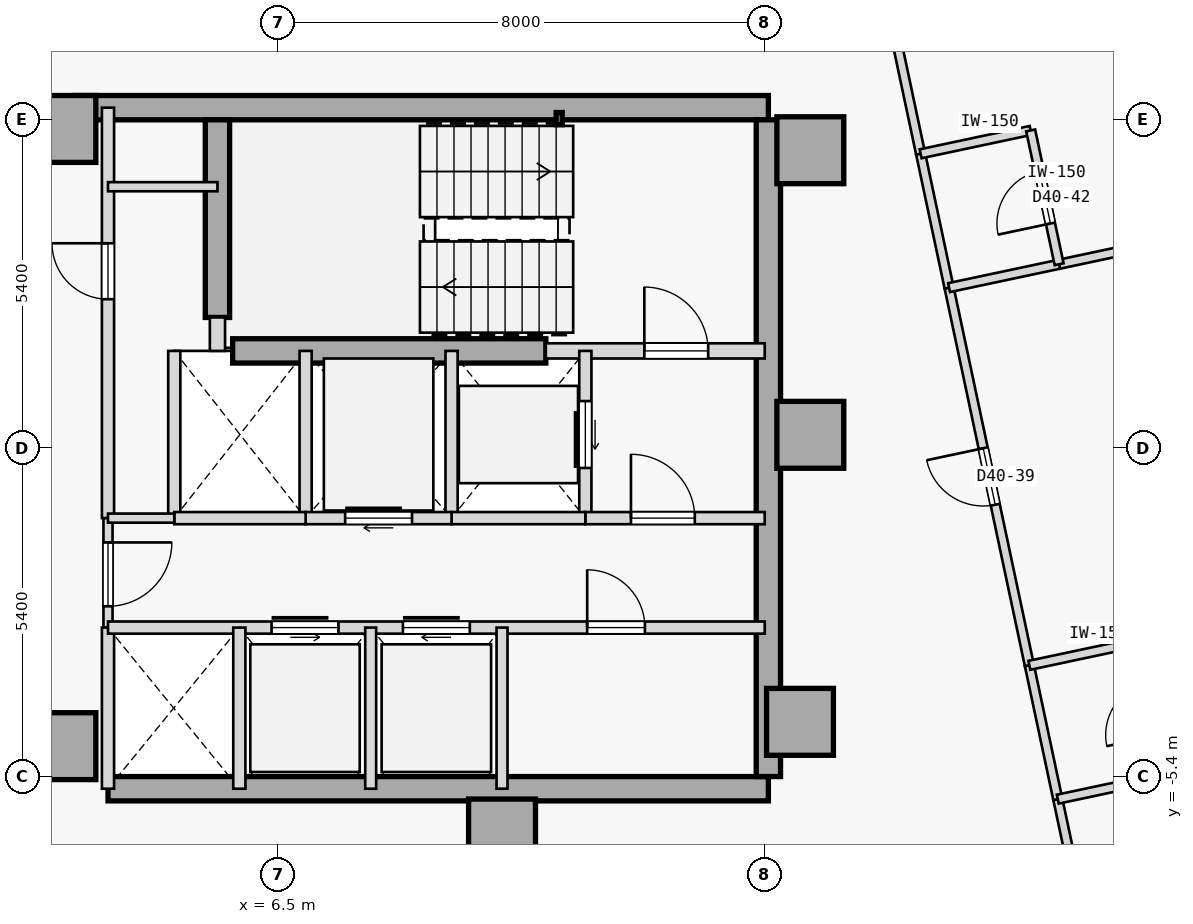
"""IFC4 building model, lengths in metres.
Left out: names, types, materials, properties, quantities, classifications, styles, units other than length and angle.
Written with IfcOpenShell. Run it as: python <this file> out.ifc"""

import sys

from ifc_helpers import new_model, si_unit, direction, frame, frame_2d, origin, origin_2d, place, context, subcontext, project, spatial, rectangle, hollow_rectangle, extrude, element, fill, save


model = new_model("IFC4")
c1 = context("Model", 3, precision=1e-05, world=origin(), true_north=direction((0.0, 1.0)))
c2 = subcontext(c1, "Body", "Model", "MODEL_VIEW")
j1 = project(units=[si_unit("LENGTHUNIT", "METRE"), si_unit("PLANEANGLEUNIT", "RADIAN")], contexts=[c1])
p1 = place(None, origin())
s1 = spatial("IfcSite", under=j1, at=p1, CompositionType="ELEMENT")
p2 = place(p1, origin())
s2 = spatial("IfcBuilding", under=s1, at=p2, CompositionType="ELEMENT")
p3 = place(p2, frame((0.0, 0.0, 158.2)))
s3 = spatial("IfcBuildingStorey", under=s2, at=p3, CompositionType="ELEMENT", Elevation=158.2)
for number, where, z_axis, x_axis in (
    (1, (15.25, 4.9, 0.0), (0.0, 0.0, 1.0), (1.0, 0.0, 0.0)),
    (2, (15.25, 0.22, 0.0), (0.0, 0.0, 1.0), (1.0, 0.0, 0.0)),
    (3, (15.08, -4.5, 0.0), (0.0, 0.0, 1.0), (1.0, 0.0, 0.0)),
    (4, (10.18, -6.32, 0.0), (0.0, 0.0, 1.0), (1.0, 0.0, 0.0)),
    (5, (2.95, -4.9, 0.0), (0.0, 0.0, 1.0), (1.0, 0.0, 0.0)),
    (6, (2.95, 5.25, 0.0), (0.0, 0.0, 1.0), (1.0, 0.0, 0.0)),
):
    element("IfcColumn", number, at=place(p3, frame(where, z_axis=z_axis, x_axis=x_axis)), inside=s3, PredefinedType="COLUMN", context=c2, shape_type="SweptSolid", body=[
        extrude(rectangle(XDim=1.1, YDim=1.1, at=origin_2d()), origin(), (0.0, 0.0, 1.0), 3.4),
    ])
p4 = place(p3, frame((3.15, 5.6, 0.0), z_axis=(0.0, 0.0, 1.0), x_axis=(1.0, 0.0, 0.0)))
e7 = element("IfcWall", 7, at=p4, inside=s3, PredefinedType="SHEAR", context=c2, shape_type="SweptSolid", body=[
    extrude(rectangle(XDim=11.41, YDim=0.4, at=frame_2d((5.705, 0.0))), origin(), (0.0, 0.0, 1.0), 3.175),
])
p5 = place(p3, frame((3.7, -5.6, 0.0), z_axis=(0.0, 0.0, 1.0), x_axis=(1.0, 0.0, 0.0)))
e8 = element("IfcWall", 8, at=p5, inside=s3, PredefinedType="SHEAR", context=c2, shape_type="SweptSolid", body=[
    extrude(rectangle(XDim=10.86, YDim=0.4, at=frame_2d((5.43, 0.0))), origin(), (0.0, 0.0, 1.0), 3.175),
])
p6 = place(p3, frame((14.56, -5.4, 0.0), z_axis=(0.0, 0.0, 1.0), x_axis=(0.0, 1.0, 0.0)))
e9 = element("IfcWall", 9, at=p6, inside=s3, PredefinedType="SHEAR", context=c2, shape_type="SweptSolid", body=[
    extrude(rectangle(XDim=10.8, YDim=0.4, at=frame_2d((5.4, 0.0))), origin(), (0.0, 0.0, 1.0), 3.175),
])
p7 = place(p3, frame((5.5, 2.15, 0.0), z_axis=(0.0, 0.0, 1.0), x_axis=(0.0, 1.0, 0.0)))
e10 = element("IfcWall", 10, at=p7, inside=s3, PredefinedType="SHEAR", context=c2, shape_type="SweptSolid", body=[
    extrude(rectangle(XDim=3.25, YDim=0.4, at=frame_2d((1.625, 0.0))), origin(), (0.0, 0.0, 1.0), 3.175),
])
p8 = place(p3, frame((5.75, 1.6, 0.0), z_axis=(0.0, 0.0, 1.0), x_axis=(1.0, 0.0, 0.0)))
e11 = element("IfcWall", 11, at=p8, inside=s3, PredefinedType="SHEAR", context=c2, shape_type="SweptSolid", body=[
    extrude(rectangle(XDim=5.15, YDim=0.4, at=frame_2d((2.575, 0.0))), origin(), (0.0, 0.0, 1.0), 3.175),
])
p9 = place(p3, frame((11.12, 5.42, 0.0), z_axis=(0.0, 0.0, 1.0), x_axis=(1.0, 0.0, 0.0)))
e12 = element("IfcColumn", 12, at=p9, inside=s3, PredefinedType="COLUMN", context=c2, shape_type="SweptSolid", body=[
    extrude(hollow_rectangle(XDim=0.1, YDim=0.2, WallThickness=0.008, at=origin_2d()), origin(), (0.0, 0.0, 1.0), 3.4),
])
p10 = place(p3, frame((10.9, 1.6, 0.0), z_axis=(0.0, 0.0, 1.0), x_axis=(1.0, 0.0, 0.0)))
e13 = element("IfcWall", 13, at=p10, inside=s3, PredefinedType="STANDARD", context=c2, shape_type="SweptSolid", body=[
    extrude(rectangle(XDim=3.6, YDim=0.25, at=frame_2d((1.8, 0.0))), origin(), (0.0, 0.0, 1.0), 3.175),
])
p11 = place(p10, frame((1.62, 0.0, 0.0)))
e14 = element("IfcOpeningElement", 14, at=p11, cuts=e13, PredefinedType="OPENING", context=c2, shape_type="SweptSolid", body=[
    extrude(rectangle(XDim=1.05, YDim=2.15, at=frame_2d((0.525, 1.075))), frame((0.0, 0.135, 0.0), z_axis=(0.0, -1.0, 0.0), x_axis=(1.0, 0.0, 0.0)), (0.0, 0.0, 1.0), 0.27),
])
p12 = place(p3, frame((5.5, 1.6, 0.0), z_axis=(0.0, 0.0, 1.0), x_axis=(0.0, 1.0, 0.0)))
e15 = element("IfcWall", 15, at=p12, inside=s3, PredefinedType="STANDARD", context=c2, shape_type="SweptSolid", body=[
    extrude(rectangle(XDim=0.55, YDim=0.25, at=frame_2d((0.275, 0.0))), origin(), (0.0, 0.0, 1.0), 3.175),
])
p13 = place(p3, frame((3.7, -1.15, 0.0), z_axis=(0.0, 0.0, 1.0), x_axis=(0.0, 1.0, 0.0)))
e16 = element("IfcWall", 16, at=p13, inside=s3, PredefinedType="STANDARD", context=c2, shape_type="SweptSolid", body=[
    extrude(rectangle(XDim=6.75, YDim=0.2, at=frame_2d((3.375, 0.0))), origin(), (0.0, 0.0, 1.0), 3.175),
])
p14 = place(p13, frame((3.6, 0.0, 0.0)))
e17 = element("IfcOpeningElement", 17, at=p14, cuts=e16, PredefinedType="OPENING", context=c2, shape_type="SweptSolid", body=[
    extrude(rectangle(XDim=0.92, YDim=2.15, at=frame_2d((0.46, 1.075))), frame((0.0, 0.11, 0.0), z_axis=(0.0, -1.0, 0.0), x_axis=(1.0, 0.0, 0.0)), (0.0, 0.0, 1.0), 0.22),
])
p15 = place(p3, frame((3.7, -2.95, 0.0), z_axis=(0.0, 0.0, 1.0), x_axis=(0.0, 1.0, 0.0)))
e18 = element("IfcWall", 18, at=p15, inside=s3, PredefinedType="PARTITIONING", context=c2, shape_type="SweptSolid", body=[
    extrude(rectangle(XDim=1.8, YDim=0.15, at=frame_2d((0.9, 0.0))), origin(), (0.0, 0.0, 1.0), 3.175),
])
p16 = place(p15, frame((0.35, 0.0, 0.0)))
e19 = element("IfcOpeningElement", 19, at=p16, cuts=e18, PredefinedType="OPENING", context=c2, shape_type="SweptSolid", body=[
    extrude(rectangle(XDim=1.05, YDim=2.18, at=frame_2d((0.525, 1.09))), frame((0.0, 0.085, 0.0), z_axis=(0.0, -1.0, 0.0), x_axis=(1.0, 0.0, 0.0)), (0.0, 0.0, 1.0), 0.17),
])
p17 = place(p3, frame((3.7, -5.6, 0.0), z_axis=(0.0, 0.0, 1.0), x_axis=(0.0, 1.0, 0.0)))
e20 = element("IfcWall", 20, at=p17, inside=s3, PredefinedType="STANDARD", context=c2, shape_type="SweptSolid", body=[
    extrude(rectangle(XDim=2.65, YDim=0.2, at=frame_2d((1.325, 0.0))), origin(), (0.0, 0.0, 1.0), 3.175),
])
p18 = place(p3, frame((11.55, -1.15, 0.0), z_axis=(0.0, 0.0, 1.0), x_axis=(0.0, 1.0, 0.0)))
e21 = element("IfcWall", 21, at=p18, inside=s3, PredefinedType="STANDARD", context=c2, shape_type="SweptSolid", body=[
    extrude(rectangle(XDim=2.75, YDim=0.2, at=frame_2d((1.375, 0.0))), origin(), (0.0, 0.0, 1.0), 3.175),
])
p19 = place(p18, frame((0.825, 0.0, 0.0)))
e22 = element("IfcOpeningElement", 22, at=p19, cuts=e21, PredefinedType="OPENING", context=c2, shape_type="SweptSolid", body=[
    extrude(rectangle(XDim=1.1, YDim=2.15, at=frame_2d((0.55, 1.075))), frame((0.0, 0.11, 0.0), z_axis=(0.0, -1.0, 0.0), x_axis=(1.0, 0.0, 0.0)), (0.0, 0.0, 1.0), 0.22),
])
p20 = place(p3, frame((9.35, -1.15, 0.0), z_axis=(0.0, 0.0, 1.0), x_axis=(0.0, 1.0, 0.0)))
e23 = element("IfcWall", 23, at=p20, inside=s3, PredefinedType="STANDARD", context=c2, shape_type="SweptSolid", body=[
    extrude(rectangle(XDim=2.75, YDim=0.2, at=frame_2d((1.375, 0.0))), origin(), (0.0, 0.0, 1.0), 3.175),
])
p21 = place(p3, frame((11.55, -1.15, 0.0), z_axis=(0.0, 0.0, 1.0), x_axis=(1.0, 0.0, 0.0)))
e24 = element("IfcWall", 24, at=p21, inside=s3, PredefinedType="STANDARD", context=c2, shape_type="SweptSolid", body=[
    extrude(rectangle(XDim=2.95, YDim=0.2, at=frame_2d((1.475, 0.0))), origin(), (0.0, 0.0, 1.0), 3.175),
])
p22 = place(p21, frame((0.75, 0.0, 0.0)))
e25 = element("IfcOpeningElement", 25, at=p22, cuts=e24, PredefinedType="OPENING", context=c2, shape_type="SweptSolid", body=[
    extrude(rectangle(XDim=1.05, YDim=2.18, at=frame_2d((0.525, 1.09))), frame((0.0, 0.11, 0.0), z_axis=(0.0, -1.0, 0.0), x_axis=(1.0, 0.0, 0.0)), (0.0, 0.0, 1.0), 0.22),
])
p23 = place(p3, frame((9.35, -1.15, 0.0), z_axis=(0.0, 0.0, 1.0), x_axis=(1.0, 0.0, 0.0)))
e26 = element("IfcWall", 26, at=p23, inside=s3, PredefinedType="STANDARD", context=c2, shape_type="SweptSolid", body=[
    extrude(rectangle(XDim=2.2, YDim=0.2, at=frame_2d((1.1, 0.0))), origin(), (0.0, 0.0, 1.0), 3.175),
])
p24 = place(p3, frame((6.95, -1.15, 0.0), z_axis=(0.0, 0.0, 1.0), x_axis=(0.0, 1.0, 0.0)))
e27 = element("IfcWall", 27, at=p24, inside=s3, PredefinedType="STANDARD", context=c2, shape_type="SweptSolid", body=[
    extrude(rectangle(XDim=2.75, YDim=0.2, at=frame_2d((1.375, 0.0))), origin(), (0.0, 0.0, 1.0), 3.175),
])
p25 = place(p3, frame((6.95, -1.15, 0.0), z_axis=(0.0, 0.0, 1.0), x_axis=(1.0, 0.0, 0.0)))
e28 = element("IfcWall", 28, at=p25, inside=s3, PredefinedType="STANDARD", context=c2, shape_type="SweptSolid", body=[
    extrude(rectangle(XDim=2.4, YDim=0.2, at=frame_2d((1.2, 0.0))), origin(), (0.0, 0.0, 1.0), 3.175),
])
p26 = place(p25, frame((0.65, 0.0, 0.0)))
e29 = element("IfcOpeningElement", 29, at=p26, cuts=e28, PredefinedType="OPENING", context=c2, shape_type="SweptSolid", body=[
    extrude(rectangle(XDim=1.1, YDim=2.15, at=frame_2d((0.55, 1.075))), frame((0.0, 0.11, 0.0), z_axis=(0.0, -1.0, 0.0), x_axis=(1.0, 0.0, 0.0)), (0.0, 0.0, 1.0), 0.22),
])
p27 = place(p3, frame((4.79, -1.15, 0.0), z_axis=(0.0, 0.0, 1.0), x_axis=(0.0, 1.0, 0.0)))
e30 = element("IfcWall", 30, at=p27, inside=s3, PredefinedType="STANDARD", context=c2, shape_type="SweptSolid", body=[
    extrude(rectangle(XDim=2.75, YDim=0.2, at=frame_2d((1.375, 0.0))), origin(), (0.0, 0.0, 1.0), 3.175),
])
p28 = place(p3, frame((4.79, -1.15, 0.0), z_axis=(0.0, 0.0, 1.0), x_axis=(1.0, 0.0, 0.0)))
e31 = element("IfcWall", 31, at=p28, inside=s3, PredefinedType="STANDARD", context=c2, shape_type="SweptSolid", body=[
    extrude(rectangle(XDim=2.16, YDim=0.2, at=frame_2d((1.08, 0.0))), origin(), (0.0, 0.0, 1.0), 3.175),
])
p29 = place(p3, frame((3.7, -1.15, 0.0), z_axis=(0.0, 0.0, 1.0), x_axis=(1.0, 0.0, 0.0)))
e32 = element("IfcWall", 32, at=p29, inside=s3, PredefinedType="PARTITIONING", context=c2, shape_type="SweptSolid", body=[
    extrude(rectangle(XDim=1.09, YDim=0.15, at=frame_2d((0.545, 0.0))), origin(), (0.0, 0.0, 1.0), 3.175),
])
p30 = place(p3, frame((3.7, -2.95, 0.0), z_axis=(0.0, 0.0, 1.0), x_axis=(1.0, 0.0, 0.0)))
e33 = element("IfcWall", 33, at=p30, inside=s3, PredefinedType="STANDARD", context=c2, shape_type="SweptSolid", body=[
    extrude(rectangle(XDim=10.8, YDim=0.2, at=frame_2d((5.4, 0.0))), origin(), (0.0, 0.0, 1.0), 3.175),
])
p31 = place(p30, frame((2.69, 0.0, 0.0)))
e34 = element("IfcOpeningElement", 34, at=p31, cuts=e33, PredefinedType="OPENING", context=c2, shape_type="SweptSolid", body=[
    extrude(rectangle(XDim=1.1, YDim=2.15, at=frame_2d((0.55, 1.075))), frame((0.0, 0.11, 0.0), z_axis=(0.0, -1.0, 0.0), x_axis=(1.0, 0.0, 0.0)), (0.0, 0.0, 1.0), 0.22),
])
p32 = place(p30, frame((4.85, 0.0, 0.0)))
e35 = element("IfcOpeningElement", 35, at=p32, cuts=e33, PredefinedType="OPENING", context=c2, shape_type="SweptSolid", body=[
    extrude(rectangle(XDim=1.1, YDim=2.15, at=frame_2d((0.55, 1.075))), frame((0.0, 0.11, 0.0), z_axis=(0.0, -1.0, 0.0), x_axis=(1.0, 0.0, 0.0)), (0.0, 0.0, 1.0), 0.22),
])
p33 = place(p30, frame((7.88, 0.0, 0.0)))
e36 = element("IfcOpeningElement", 36, at=p33, cuts=e33, PredefinedType="OPENING", context=c2, shape_type="SweptSolid", body=[
    extrude(rectangle(XDim=0.95, YDim=2.15, at=frame_2d((0.475, 1.075))), frame((0.0, 0.11, 0.0), z_axis=(0.0, -1.0, 0.0), x_axis=(1.0, 0.0, 0.0)), (0.0, 0.0, 1.0), 0.22),
])
p34 = place(p3, frame((5.86, -5.6, 0.0), z_axis=(0.0, 0.0, 1.0), x_axis=(0.0, 1.0, 0.0)))
e37 = element("IfcWall", 37, at=p34, inside=s3, PredefinedType="STANDARD", context=c2, shape_type="SweptSolid", body=[
    extrude(rectangle(XDim=2.65, YDim=0.2, at=frame_2d((1.325, 0.0))), origin(), (0.0, 0.0, 1.0), 3.175),
])
for number, where, z_axis, x_axis in (
    (38, (10.18, -5.6, 0.0), (0.0, 0.0, 1.0), (0.0, 1.0, 0.0)),
    (39, (8.02, -5.6, 0.0), (0.0, 0.0, 1.0), (0.0, 1.0, 0.0)),
):
    element("IfcWall", number, at=place(p3, frame(where, z_axis=z_axis, x_axis=x_axis)), inside=s3, PredefinedType="STANDARD", context=c2, shape_type="SweptSolid", body=[
        extrude(rectangle(XDim=2.65, YDim=0.18, at=frame_2d((1.325, 0.0))), origin(), (0.0, 0.0, 1.0), 3.175),
    ])
p35 = place(p3, frame((3.7, 4.3, 0.0), z_axis=(0.0, 0.0, 1.0), x_axis=(1.0, 0.0, 0.0)))
e40 = element("IfcWall", 40, at=p35, inside=s3, PredefinedType="PARTITIONING", context=c2, shape_type="SweptSolid", body=[
    extrude(rectangle(XDim=1.8, YDim=0.15, at=frame_2d((0.9, 0.0))), origin(), (0.0, 0.0, 1.0), 3.175),
])
p36 = place(p3, frame((20.328, -10.515, 0.0), z_axis=(0.0, 0.0, 1.0), x_axis=(-0.207950868925, 0.97813927235, 0.0)))
e41 = element("IfcWall", 41, at=p36, inside=s3, PredefinedType="PARTITIONING", context=c2, shape_type="SweptSolid", body=[
    extrude(rectangle(XDim=4.85, YDim=0.15, at=frame_2d((2.425, 0.0))), origin(), (0.0, 0.0, 1.0), 3.175),
])
p37 = place(p36, frame((1.95, 0.0, 0.0)))
e42 = element("IfcOpeningElement", 42, at=p37, cuts=e41, PredefinedType="OPENING", context=c2, shape_type="SweptSolid", body=[
    extrude(rectangle(XDim=0.95, YDim=2.15, at=frame_2d((0.475, 1.075))), frame((0.0, 0.085, 0.0), z_axis=(0.0, -1.0, 0.0), x_axis=(1.0, 0.0, 0.0)), (0.0, 0.0, 1.0), 0.17),
])
p38 = place(p3, frame((18.852, -3.571, 0.0), z_axis=(0.0, 0.0, 1.0), x_axis=(-0.207879907349, 0.978154355979, 0.0)))
e43 = element("IfcWall", 43, at=p38, inside=s3, PredefinedType="PARTITIONING", context=c2, shape_type="SweptSolid", body=[
    extrude(rectangle(XDim=6.35, YDim=0.15, at=frame_2d((3.175, 0.0))), origin(), (0.0, 0.0, 1.0), 3.175),
])
p39 = place(p38, frame((2.7, 0.0, 0.0)))
e44 = element("IfcOpeningElement", 44, at=p39, cuts=e43, PredefinedType="OPENING", context=c2, shape_type="SweptSolid", body=[
    extrude(rectangle(XDim=0.95, YDim=2.15, at=frame_2d((0.475, 1.075))), frame((0.0, 0.085, 0.0), z_axis=(0.0, -1.0, 0.0), x_axis=(1.0, 0.0, 0.0)), (0.0, 0.0, 1.0), 0.17),
])
p40 = place(p3, frame((19.32, -5.771, 0.0), z_axis=(0.0, 0.0, 1.0), x_axis=(-0.207913264065, 0.978147266328, 0.0)))
e45 = element("IfcWall", 45, at=p40, inside=s3, PredefinedType="PARTITIONING", context=c2, shape_type="SweptSolid", body=[
    extrude(rectangle(XDim=2.25, YDim=0.15, at=frame_2d((1.125, 0.0))), origin(), (0.0, 0.0, 1.0), 3.175),
])
p41 = place(p3, frame((17.064, 4.841, 0.0), z_axis=(0.0, 0.0, 1.0), x_axis=(-0.207924511115, 0.978144875608, 0.0)))
e46 = element("IfcWall", 46, at=p41, inside=s3, PredefinedType="PARTITIONING", context=c2, shape_type="SweptSolid", body=[
    extrude(rectangle(XDim=6.35, YDim=0.15, at=frame_2d((3.175, 0.0))), origin(), (0.0, 0.0, 1.0), 3.175),
])
p42 = place(p41, frame((2.7, 0.0, 0.0)))
e47 = element("IfcOpeningElement", 47, at=p42, cuts=e46, PredefinedType="OPENING", context=c2, shape_type="SweptSolid", body=[
    extrude(rectangle(XDim=0.95, YDim=2.15, at=frame_2d((0.475, 1.075))), frame((0.0, 0.085, 0.0), z_axis=(0.0, -1.0, 0.0), x_axis=(1.0, 0.0, 0.0)), (0.0, 0.0, 1.0), 0.17),
])
p43 = place(p3, frame((17.532, 2.641, 0.0), z_axis=(0.0, 0.0, 1.0), x_axis=(-0.207913264065, 0.978147266328, 0.0)))
e48 = element("IfcWall", 48, at=p43, inside=s3, PredefinedType="PARTITIONING", context=c2, shape_type="SweptSolid", body=[
    extrude(rectangle(XDim=2.25, YDim=0.15, at=frame_2d((1.125, 0.0))), origin(), (0.0, 0.0, 1.0), 3.175),
])
p44 = place(p3, frame((19.32, -5.771, 0.0), z_axis=(0.0, 0.0, 1.0), x_axis=(0.978165892835, 0.207825614625, 0.0)))
e49 = element("IfcWall", 49, at=p44, inside=s3, PredefinedType="PARTITIONING", context=c2, shape_type="SweptSolid", body=[
    extrude(rectangle(XDim=1.85, YDim=0.15, at=frame_2d((0.925, 0.0))), origin(), (0.0, 0.0, 1.0), 3.175),
])
p45 = place(p3, frame((18.852, -3.571, 0.0), z_axis=(0.0, 0.0, 1.0), x_axis=(0.978139061018, 0.207951862966, 0.0)))
e50 = element("IfcWall", 50, at=p45, inside=s3, PredefinedType="PARTITIONING", context=c2, shape_type="SweptSolid", body=[
    extrude(rectangle(XDim=1.85, YDim=0.15, at=frame_2d((0.925, 0.0))), origin(), (0.0, 0.0, 1.0), 3.175),
])
p46 = place(p3, frame((19.341, 3.025, 0.0), z_axis=(0.0, 0.0, 1.0), x_axis=(0.97814556055, 0.207921288896, 0.0)))
e51 = element("IfcWall", 51, at=p46, inside=s3, PredefinedType="PARTITIONING", context=c2, shape_type="SweptSolid", body=[
    extrude(rectangle(XDim=12.187, YDim=0.15, at=frame_2d((6.094, 0.0))), origin(), (0.0, 0.0, 1.0), 3.175),
])
p47 = place(p3, frame((17.532, 2.641, 0.0), z_axis=(0.0, 0.0, 1.0), x_axis=(0.978160192495, 0.207852442415, 0.0)))
e52 = element("IfcWall", 52, at=p47, inside=s3, PredefinedType="PARTITIONING", context=c2, shape_type="SweptSolid", body=[
    extrude(rectangle(XDim=1.85, YDim=0.15, at=frame_2d((0.925, 0.0))), origin(), (0.0, 0.0, 1.0), 3.175),
])
p48 = place(p3, frame((17.064, 4.841, 0.0), z_axis=(0.0, 0.0, 1.0), x_axis=(0.978133353907, 0.20797870558, 0.0)))
e53 = element("IfcWall", 53, at=p48, inside=s3, PredefinedType="PARTITIONING", context=c2, shape_type="SweptSolid", body=[
    extrude(rectangle(XDim=1.85, YDim=0.15, at=frame_2d((0.925, 0.0))), origin(), (0.0, 0.0, 1.0), 3.175),
])
p49 = place(p3, frame((19.341, 3.025, 0.0), z_axis=(0.0, 0.0, 1.0), x_axis=(-0.207891197838, 0.978151956427, 0.0)))
e54 = element("IfcWall", 54, at=p49, inside=s3, PredefinedType="PARTITIONING", context=c2, shape_type="SweptSolid", body=[
    extrude(rectangle(XDim=2.25, YDim=0.15, at=frame_2d((1.125, 0.0))), origin(), (0.0, 0.0, 1.0), 3.175),
])
p50 = place(p49, frame((0.685, 0.0, 0.0)))
e55 = element("IfcOpeningElement", 55, at=p50, cuts=e54, PredefinedType="OPENING", context=c2, shape_type="SweptSolid", body=[
    extrude(rectangle(XDim=0.88, YDim=2.15, at=frame_2d((0.44, 1.075))), frame((0.0, 0.085, 0.0), z_axis=(0.0, -1.0, 0.0), x_axis=(1.0, 0.0, 0.0)), (0.0, 0.0, 1.0), 0.17),
])
p51 = place(p11, origin())
e56 = element("IfcDoor", 56, at=p51, inside=s3, OperationType="SINGLE_SWING_LEFT", PredefinedType="DOOR", context=c2, shape_type="SweptSolid", body=[
    extrude(rectangle(XDim=1.05, YDim=2.15, at=frame_2d((0.525, 1.075))), frame((0.0, 0.025, 0.0), z_axis=(0.0, -1.0, 0.0), x_axis=(1.0, 0.0, 0.0)), (0.0, 0.0, 1.0), 0.05),
])
fill(e14, e56)
p52 = place(p22, origin())
e57 = element("IfcDoor", 57, at=p52, inside=s3, OperationType="SINGLE_SWING_LEFT", PredefinedType="DOOR", context=c2, shape_type="SweptSolid", body=[
    extrude(rectangle(XDim=1.05, YDim=2.18, at=frame_2d((0.525, 1.09))), frame((0.0, 0.025, 0.0), z_axis=(0.0, -1.0, 0.0), x_axis=(1.0, 0.0, 0.0)), (0.0, 0.0, 1.0), 0.05),
])
fill(e25, e57)
p53 = place(p16, frame((1.05, 0.0, 0.0), z_axis=(0.0, 0.0, 1.0), x_axis=(-1.0, 0.0, 0.0)))
e58 = element("IfcDoor", 58, at=p53, inside=s3, OperationType="SINGLE_SWING_RIGHT", PredefinedType="DOOR", context=c2, shape_type="SweptSolid", body=[
    extrude(rectangle(XDim=1.05, YDim=2.18, at=frame_2d((0.525, 1.09))), frame((0.0, 0.025, 0.0), z_axis=(0.0, -1.0, 0.0), x_axis=(1.0, 0.0, 0.0)), (0.0, 0.0, 1.0), 0.05),
])
fill(e19, e58)
p54 = place(p19, origin())
e59 = element("IfcDoor", 59, at=p54, inside=s3, OperationType="SLIDING_TO_RIGHT", PredefinedType="DOOR", context=c2, shape_type="SweptSolid", body=[
    extrude(rectangle(XDim=1.1, YDim=2.15, at=frame_2d((0.55, 1.075))), frame((0.0, 0.025, 0.0), z_axis=(0.0, -1.0, 0.0), x_axis=(1.0, 0.0, 0.0)), (0.0, 0.0, 1.0), 0.05),
])
fill(e22, e59)
p55 = place(p26, origin())
e60 = element("IfcDoor", 60, at=p55, inside=s3, OperationType="SLIDING_TO_RIGHT", PredefinedType="DOOR", context=c2, shape_type="SweptSolid", body=[
    extrude(rectangle(XDim=1.1, YDim=2.15, at=frame_2d((0.55, 1.075))), frame((0.0, 0.025, 0.0), z_axis=(0.0, -1.0, 0.0), x_axis=(1.0, 0.0, 0.0)), (0.0, 0.0, 1.0), 0.05),
])
fill(e29, e60)
p56 = place(p31, origin())
e61 = element("IfcDoor", 61, at=p56, inside=s3, OperationType="SLIDING_TO_LEFT", PredefinedType="DOOR", context=c2, shape_type="SweptSolid", body=[
    extrude(rectangle(XDim=1.1, YDim=2.15, at=frame_2d((0.55, 1.075))), frame((0.0, 0.025, 0.0), z_axis=(0.0, -1.0, 0.0), x_axis=(1.0, 0.0, 0.0)), (0.0, 0.0, 1.0), 0.05),
])
fill(e34, e61)
p57 = place(p32, origin())
e62 = element("IfcDoor", 62, at=p57, inside=s3, OperationType="SLIDING_TO_RIGHT", PredefinedType="DOOR", context=c2, shape_type="SweptSolid", body=[
    extrude(rectangle(XDim=1.1, YDim=2.15, at=frame_2d((0.55, 1.075))), frame((0.0, 0.025, 0.0), z_axis=(0.0, -1.0, 0.0), x_axis=(1.0, 0.0, 0.0)), (0.0, 0.0, 1.0), 0.05),
])
fill(e35, e62)
p58 = place(p33, origin())
e63 = element("IfcDoor", 63, at=p58, inside=s3, OperationType="SINGLE_SWING_LEFT", PredefinedType="DOOR", context=c2, shape_type="SweptSolid", body=[
    extrude(rectangle(XDim=0.95, YDim=2.15, at=frame_2d((0.475, 1.075))), frame((0.0, 0.025, 0.0), z_axis=(0.0, -1.0, 0.0), x_axis=(1.0, 0.0, 0.0)), (0.0, 0.0, 1.0), 0.05),
])
fill(e36, e63)
p59 = place(p14, origin())
e64 = element("IfcDoor", 64, at=p59, inside=s3, OperationType="SINGLE_SWING_RIGHT", PredefinedType="DOOR", context=c2, shape_type="SweptSolid", body=[
    extrude(rectangle(XDim=0.92, YDim=2.15, at=frame_2d((0.46, 1.075))), frame((0.0, 0.025, 0.0), z_axis=(0.0, -1.0, 0.0), x_axis=(1.0, 0.0, 0.0)), (0.0, 0.0, 1.0), 0.05),
])
fill(e17, e64)
p60 = place(p39, origin())
e65 = element("IfcDoor", 65, at=p60, inside=s3, OperationType="SINGLE_SWING_RIGHT", PredefinedType="DOOR", context=c2, shape_type="SweptSolid", body=[
    extrude(rectangle(XDim=0.95, YDim=2.15, at=frame_2d((0.475, 1.075))), frame((0.0, 0.025, 0.0), z_axis=(0.0, -1.0, 0.0), x_axis=(1.0, 0.0, 0.0)), (0.0, 0.0, 1.0), 0.05),
])
fill(e44, e65)
p61 = place(p50, origin())
e66 = element("IfcDoor", 66, at=p61, inside=s3, OperationType="SINGLE_SWING_LEFT", PredefinedType="DOOR", context=c2, shape_type="SweptSolid", body=[
    extrude(rectangle(XDim=0.88, YDim=2.15, at=frame_2d((0.44, 1.075))), frame((0.0, 0.025, 0.0), z_axis=(0.0, -1.0, 0.0), x_axis=(1.0, 0.0, 0.0)), (0.0, 0.0, 1.0), 0.05),
])
fill(e55, e66)
save(model, sys.argv[1])
